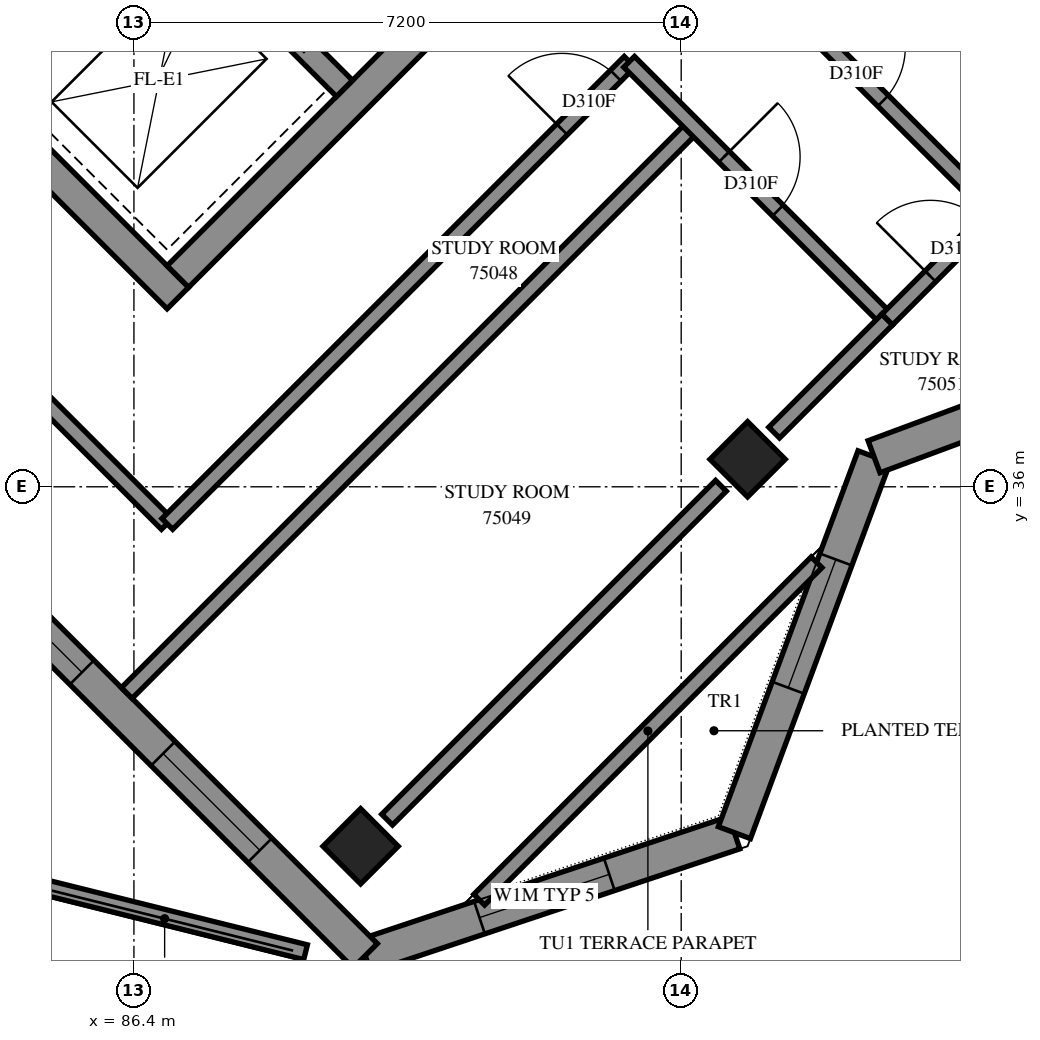
"""IFC4 building model, lengths in metres.
Left out: names, types, materials, properties, quantities, classifications, styles, units other than length and angle.
Written with IfcOpenShell. Run it as: python <this file> out.ifc"""

import sys

from ifc_helpers import new_model, si_unit, direction, frame, frame_2d, origin, origin_2d, place, context, subcontext, project, spatial, polyline, rectangle, outline, extrude, element, fill, save


model = new_model("IFC4")
c1 = context("Model", 3, precision=1e-05, world=origin(), true_north=direction((0.0, 1.0)))
c2 = subcontext(c1, "Body", "Model", "MODEL_VIEW")
j1 = project(units=[si_unit("LENGTHUNIT", "METRE"), si_unit("PLANEANGLEUNIT", "RADIAN")], contexts=[c1])
p1 = place(None, origin())
s1 = spatial("IfcSite", under=j1, at=p1, CompositionType="ELEMENT")
p2 = place(p1, origin())
s2 = spatial("IfcBuilding", under=s1, at=p2, CompositionType="ELEMENT")
p3 = place(p2, frame((0.0, 0.0, 274.4)))
s3 = spatial("IfcBuildingStorey", under=s2, at=p3, CompositionType="ELEMENT", Elevation=274.4)
for number, where, z_axis, x_axis in (
    (1, (94.474, 36.362, 0.0), (0.0, 0.0, 1.0), (0.707, -0.707, 0.0)),
    (2, (89.382, 31.271, 0.0), (0.0, 0.0, 1.0), (0.707, -0.707, 0.0)),
):
    element("IfcColumn", number, at=place(p3, frame(where, z_axis=z_axis, x_axis=x_axis)), inside=s3, PredefinedType="COLUMN", context=c2, shape_type="SweptSolid", body=[
        extrude(rectangle(XDim=0.7, YDim=0.7, at=origin_2d()), origin(), (0.0, 0.0, 1.0), 3.1),
    ])
p4 = place(p3, frame((76.23, 49.231, -0.3), z_axis=(0.0, 0.0, 1.0), x_axis=(0.7071034917, -0.7071100706, 0.0)))
e3 = element("IfcWall", 3, at=p4, inside=s3, PredefinedType="SHEAR", context=c2, shape_type="SweptSolid", body=[
    extrude(rectangle(XDim=15.2, YDim=0.4, at=frame_2d((7.6, 0.0))), origin(), (0.0, 0.0, 1.0), 2.7),
])
p5 = place(p3, frame((86.978, 38.766, -0.3), z_axis=(0.0, 0.0, 1.0), x_axis=(0.7071067812, 0.7071067812, 0.0)))
e4 = element("IfcWall", 4, at=p5, inside=s3, PredefinedType="SHEAR", context=c2, shape_type="SweptSolid", body=[
    extrude(rectangle(XDim=14.4, YDim=0.4, at=frame_2d((7.2, 0.0))), origin(), (0.0, 0.0, 1.0), 2.7),
])
p6 = place(p5, frame((4.55, 0.0, 0.3)))
e5 = element("IfcOpeningElement", 5, at=p6, cuts=e4, PredefinedType="OPENING", context=c2, shape_type="SweptSolid", body=[
    extrude(rectangle(XDim=1.1, YDim=2.1, at=frame_2d((0.55, 1.05))), frame((0.0, 0.21, 0.0), z_axis=(0.0, -1.0, 0.0), x_axis=(1.0, 0.0, 0.0)), (0.0, 0.0, 1.0), 0.42),
])
p7 = place(p5, frame((11.35, 0.0, 0.3)))
e6 = element("IfcOpeningElement", 6, at=p7, cuts=e4, PredefinedType="OPENING", context=c2, shape_type="SweptSolid", body=[
    extrude(rectangle(XDim=1.1, YDim=2.1, at=frame_2d((0.55, 1.05))), frame((0.0, 0.21, 0.0), z_axis=(0.0, -1.0, 0.0), x_axis=(1.0, 0.0, 0.0)), (0.0, 0.0, 1.0), 0.42),
])
p8 = place(p3, frame((84.291, 41.453, 0.0), z_axis=(0.0, 0.0, 1.0), x_axis=(0.7071067812, 0.7071067812, 0.0)))
e7 = element("IfcWall", 7, at=p8, inside=s3, PredefinedType="SOLIDWALL", context=c2, shape_type="SweptSolid", body=[
    extrude(rectangle(XDim=3.3, YDim=0.3, at=frame_2d((1.65, 0.0))), origin(), (0.0, 0.0, 1.0), 3.1),
])
p9 = place(p3, frame((78.988, 51.423, 0.0), z_axis=(0.0, 0.0, 1.0), x_axis=(0.7071067812, -0.7071067812, 0.0)))
e8 = element("IfcWall", 8, at=p9, inside=s3, PredefinedType="SOLIDWALL", context=c2, shape_type="SweptSolid", body=[
    extrude(rectangle(XDim=14.4, YDim=0.3, at=frame_2d((7.2, 0.0))), origin(), (0.0, 0.0, 1.0), 3.1),
])
p10 = place(p9, frame((1.35, 0.0, 0.0)))
e9 = element("IfcOpeningElement", 9, at=p10, cuts=e8, PredefinedType="OPENING", context=c2, shape_type="SweptSolid", body=[
    extrude(rectangle(XDim=0.9, YDim=2.1, at=frame_2d((0.45, 1.05))), frame((0.0, 0.16, 0.0), z_axis=(0.0, -1.0, 0.0), x_axis=(1.0, 0.0, 0.0)), (0.0, 0.0, 1.0), 0.32),
])
p11 = place(p9, frame((4.95, 0.0, 0.0)))
e10 = element("IfcOpeningElement", 10, at=p11, cuts=e8, PredefinedType="OPENING", context=c2, shape_type="SweptSolid", body=[
    extrude(rectangle(XDim=0.9, YDim=2.1, at=frame_2d((0.45, 1.05))), frame((0.0, 0.16, 0.0), z_axis=(0.0, -1.0, 0.0), x_axis=(1.0, 0.0, 0.0)), (0.0, 0.0, 1.0), 0.32),
])
p12 = place(p9, frame((8.55, 0.0, 0.0)))
e11 = element("IfcOpeningElement", 11, at=p12, cuts=e8, PredefinedType="OPENING", context=c2, shape_type="SweptSolid", body=[
    extrude(rectangle(XDim=0.9, YDim=2.1, at=frame_2d((0.45, 1.05))), frame((0.0, 0.16, 0.0), z_axis=(0.0, -1.0, 0.0), x_axis=(1.0, 0.0, 0.0)), (0.0, 0.0, 1.0), 0.32),
])
p13 = place(p9, frame((12.05, 0.0, 0.0)))
e12 = element("IfcOpeningElement", 12, at=p13, cuts=e8, PredefinedType="OPENING", context=c2, shape_type="SweptSolid", body=[
    extrude(rectangle(XDim=1.1, YDim=2.1, at=frame_2d((0.55, 1.05))), frame((0.0, 0.16, 0.0), z_axis=(0.0, -1.0, 0.0), x_axis=(1.0, 0.0, 0.0)), (0.0, 0.0, 1.0), 0.32),
])
p14 = place(p3, frame((89.443, 29.831, 0.0), z_axis=(0.0, 0.0, 1.0), x_axis=(0.9486832981, 0.316227766, 0.0)))
e13 = element("IfcWall", 13, at=p14, inside=s3, PredefinedType="SOLIDWALL", context=c2, shape_type="SweptSolid", body=[
    extrude(outline(polyline([(-0.139, -0.225), (5.228, -0.225), (5.012, 0.225), (0.139, 0.225), (-0.139, -0.225)])), origin(), (0.0, 0.0, 1.0), 3.1),
])
p15 = place(p14, frame((1.584, 0.0, 0.7)))
e14 = element("IfcOpeningElement", 14, at=p15, cuts=e13, PredefinedType="OPENING", context=c2, shape_type="SweptSolid", body=[
    extrude(rectangle(XDim=1.8, YDim=1.8, at=frame_2d((0.9, 0.9))), frame((0.0, 0.235, 0.0), z_axis=(0.0, -1.0, 0.0), x_axis=(1.0, 0.0, 0.0)), (0.0, 0.0, 1.0), 0.47),
])
p16 = place(p3, frame((94.3, 31.45, 0.0), z_axis=(0.0, 0.0, 1.0), x_axis=(0.3481927166, 0.9374229739, 0.0)))
e15 = element("IfcWall", 15, at=p16, inside=s3, PredefinedType="SOLIDWALL", context=c2, shape_type="SweptSolid", body=[
    extrude(outline(polyline([(-0.108, -0.225), (5.172, -0.225), (5.379, 0.225), (0.108, 0.225), (-0.108, -0.225)])), origin(), (0.0, 0.0, 1.0), 3.1),
])
p17 = place(p16, frame((2.034, 0.0, 0.7)))
e16 = element("IfcOpeningElement", 16, at=p17, cuts=e15, PredefinedType="OPENING", context=c2, shape_type="SweptSolid", body=[
    extrude(rectangle(XDim=1.8, YDim=1.8, at=frame_2d((0.9, 0.9))), frame((0.0, 0.235, 0.0), z_axis=(0.0, -1.0, 0.0), x_axis=(1.0, 0.0, 0.0)), (0.0, 0.0, 1.0), 0.47),
])
p18 = place(p3, frame((96.137, 36.395, 0.0), z_axis=(0.0, 0.0, 1.0), x_axis=(0.937429161, 0.3481760591, 0.0)))
e17 = element("IfcWall", 17, at=p18, inside=s3, PredefinedType="SOLIDWALL", context=c2, shape_type="SweptSolid", body=[
    extrude(outline(polyline([(0.103, -0.225), (5.383, -0.225), (5.168, 0.225), (-0.103, 0.225), (0.103, -0.225)])), origin(), (0.0, 0.0, 1.0), 3.1),
])
p19 = place(p18, frame((2.151, 0.0, 0.7)))
e18 = element("IfcOpeningElement", 18, at=p19, cuts=e17, PredefinedType="OPENING", context=c2, shape_type="SweptSolid", body=[
    extrude(rectangle(XDim=1.8, YDim=1.8, at=frame_2d((0.9, 0.9))), frame((0.0, 0.235, 0.0), z_axis=(0.0, -1.0, 0.0), x_axis=(1.0, 0.0, 0.0)), (0.0, 0.0, 1.0), 0.47),
])
p20 = place(p3, frame((83.87, 35.404, 0.0), z_axis=(0.0, 0.0, 1.0), x_axis=(0.7071067812, -0.7071067812, 0.0)))
e19 = element("IfcWall", 19, at=p20, inside=s3, PredefinedType="SOLIDWALL", context=c2, shape_type="SweptSolid", body=[
    extrude(outline(polyline([(0.063, -0.225), (8.021, -0.225), (7.743, 0.225), (-0.063, 0.225), (0.063, -0.225)])), origin(), (0.0, 0.0, 1.0), 3.1),
])
p21 = place(p20, frame((0.81, 0.0, 0.7)))
e20 = element("IfcOpeningElement", 20, at=p21, cuts=e19, PredefinedType="OPENING", context=c2, shape_type="SweptSolid", body=[
    extrude(rectangle(XDim=1.8, YDim=1.8, at=frame_2d((0.9, 0.9))), frame((0.0, 0.235, 0.0), z_axis=(0.0, -1.0, 0.0), x_axis=(1.0, 0.0, 0.0)), (0.0, 0.0, 1.0), 0.47),
])
p22 = place(p20, frame((4.121, 0.0, 0.7)))
e21 = element("IfcOpeningElement", 21, at=p22, cuts=e19, PredefinedType="OPENING", context=c2, shape_type="SweptSolid", body=[
    extrude(rectangle(XDim=1.8, YDim=1.8, at=frame_2d((0.9, 0.9))), frame((0.0, 0.235, 0.0), z_axis=(0.0, -1.0, 0.0), x_axis=(1.0, 0.0, 0.0)), (0.0, 0.0, 1.0), 0.47),
])
p23 = place(p3, frame((95.381, 35.007, 0.0), z_axis=(0.0, 0.0, 1.0), x_axis=(-0.7071067812, -0.7071067812, 0.0)))
e22 = element("IfcWall", 22, at=p23, inside=s3, PredefinedType="PARAPET", context=c2, shape_type="SweptSolid", body=[
    extrude(outline(polyline([(0.0, -0.1), (6.277, -0.1), (6.277, 0.1), (0.0, 0.1), (0.0, -0.1)])), origin(), (0.0, 0.0, 1.0), 0.25),
])
p24 = place(p3, frame((86.306, 33.287, 0.0), z_axis=(0.0, 0.0, 1.0), x_axis=(0.7071020418, 0.7071115206, 0.0)))
e23 = element("IfcWall", 23, at=p24, inside=s3, PredefinedType="PARTITIONING", context=c2, shape_type="SweptSolid", body=[
    extrude(rectangle(XDim=10.55, YDim=0.2, at=frame_2d((5.275, 0.0))), origin(), (0.0, 0.0, 1.0), 3.1),
])
p25 = place(p3, frame((80.747, 41.597, 0.0), z_axis=(0.0, 0.0, 1.0), x_axis=(0.7071067812, -0.7071067812, 0.0)))
e24 = element("IfcWall", 24, at=p25, inside=s3, PredefinedType="PARTITIONING", context=c2, shape_type="SweptSolid", body=[
    extrude(rectangle(XDim=8.607, YDim=0.2, at=frame_2d((4.303, 0.0))), origin(), (0.0, 0.0, 1.0), 3.1),
])
p26 = place(p25, frame((0.195, 0.0, 0.0)))
e25 = element("IfcOpeningElement", 25, at=p26, cuts=e24, PredefinedType="OPENING", context=c2, shape_type="SweptSolid", body=[
    extrude(rectangle(XDim=1.0, YDim=2.1, at=frame_2d((0.5, 1.05))), frame((0.0, 0.11, 0.0), z_axis=(0.0, -1.0, 0.0), x_axis=(1.0, 0.0, 0.0)), (0.0, 0.0, 1.0), 0.22),
])
p27 = place(p25, frame((3.175, 0.0, 0.0)))
e26 = element("IfcOpeningElement", 26, at=p27, cuts=e24, PredefinedType="OPENING", context=c2, shape_type="SweptSolid", body=[
    extrude(rectangle(XDim=1.0, YDim=2.1, at=frame_2d((0.5, 1.05))), frame((0.0, 0.11, 0.0), z_axis=(0.0, -1.0, 0.0), x_axis=(1.0, 0.0, 0.0)), (0.0, 0.0, 1.0), 0.22),
])
p28 = place(p3, frame((86.839, 35.511, 0.0), z_axis=(0.0, 0.0, 1.0), x_axis=(0.707223053, 0.7069904903, 0.0)))
e27 = element("IfcWall", 27, at=p28, inside=s3, PredefinedType="PARTITIONING", context=c2, shape_type="SweptSolid", body=[
    extrude(rectangle(XDim=8.6, YDim=0.2, at=frame_2d((4.3, 0.0))), origin(), (0.0, 0.0, 1.0), 3.1),
])
p29 = place(p28, frame((7.343, 0.0, 0.0)))
e28 = element("IfcOpeningElement", 28, at=p29, cuts=e27, PredefinedType="OPENING", context=c2, shape_type="SweptSolid", body=[
    extrude(rectangle(XDim=1.0, YDim=2.1, at=frame_2d((0.5, 1.05))), frame((0.0, 0.11, 0.0), z_axis=(0.0, -1.0, 0.0), x_axis=(1.0, 0.0, 0.0)), (0.0, 0.0, 1.0), 0.22),
])
p30 = place(p3, frame((89.731, 31.621, 0.0), z_axis=(0.0, 0.0, 1.0), x_axis=(0.7071067812, 0.7071067812, 0.0)))
e29 = element("IfcWall", 29, at=p30, inside=s3, PredefinedType="PARTITIONING", context=c2, shape_type="SweptSolid", body=[
    extrude(rectangle(XDim=6.211, YDim=0.2, at=frame_2d((3.106, 0.0))), origin(), (0.0, 0.0, 1.0), 2.6),
])
p31 = place(p3, frame((92.915, 41.591, 0.0), z_axis=(0.0, 0.0, 1.0), x_axis=(0.7071067812, -0.7071067812, 0.0)))
e30 = element("IfcWall", 30, at=p31, inside=s3, PredefinedType="PARTITIONING", context=c2, shape_type="SweptSolid", body=[
    extrude(rectangle(XDim=4.8, YDim=0.2, at=frame_2d((2.4, 0.0))), origin(), (0.0, 0.0, 1.0), 3.1),
])
p32 = place(p31, frame((1.767, 0.0, 0.0)))
e31 = element("IfcOpeningElement", 31, at=p32, cuts=e30, PredefinedType="OPENING", context=c2, shape_type="SweptSolid", body=[
    extrude(rectangle(XDim=1.0, YDim=2.1, at=frame_2d((0.5, 1.05))), frame((0.0, 0.11, 0.0), z_axis=(0.0, -1.0, 0.0), x_axis=(1.0, 0.0, 0.0)), (0.0, 0.0, 1.0), 0.22),
])
p33 = place(p3, frame((94.329, 43.005, 0.0), z_axis=(0.0, 0.0, 1.0), x_axis=(0.7071067812, -0.7071067812, 0.0)))
e32 = element("IfcWall", 32, at=p33, inside=s3, PredefinedType="PARTITIONING", context=c2, shape_type="SweptSolid", body=[
    extrude(rectangle(XDim=4.8, YDim=0.2, at=frame_2d((2.4, 0.0))), origin(), (0.0, 0.0, 1.0), 3.1),
])
p34 = place(p33, frame((1.725, 0.0, 0.0)))
e33 = element("IfcOpeningElement", 33, at=p34, cuts=e32, PredefinedType="OPENING", context=c2, shape_type="SweptSolid", body=[
    extrude(rectangle(XDim=1.0, YDim=2.1, at=frame_2d((0.5, 1.05))), frame((0.0, 0.11, 0.0), z_axis=(0.0, -1.0, 0.0), x_axis=(1.0, 0.0, 0.0)), (0.0, 0.0, 1.0), 0.22),
])
p35 = place(p3, frame((94.823, 36.713, 0.0), z_axis=(0.0, 0.0, 1.0), x_axis=(0.7071067812, 0.7071067812, 0.0)))
e34 = element("IfcWall", 34, at=p35, inside=s3, PredefinedType="PARTITIONING", context=c2, shape_type="SweptSolid", body=[
    extrude(rectangle(XDim=2.104, YDim=0.2, at=frame_2d((1.052, 0.0))), origin(), (0.0, 0.0, 1.0), 2.6),
])
p36 = place(p3, frame((96.311, 38.201, 0.0), z_axis=(0.0, 0.0, 1.0), x_axis=(0.7071067812, 0.7071067812, 0.0)))
e35 = element("IfcWall", 35, at=p36, inside=s3, PredefinedType="PARTITIONING", context=c2, shape_type="SweptSolid", body=[
    extrude(rectangle(XDim=2.0, YDim=0.2, at=frame_2d((1.0, 0.0))), origin(), (0.0, 0.0, 1.0), 2.6),
])
p37 = place(p36, frame((0.803, 0.0, 0.0)))
e36 = element("IfcOpeningElement", 36, at=p37, cuts=e35, PredefinedType="OPENING", context=c2, shape_type="SweptSolid", body=[
    extrude(rectangle(XDim=1.0, YDim=2.1, at=frame_2d((0.5, 1.05))), frame((0.0, 0.11, 0.0), z_axis=(0.0, -1.0, 0.0), x_axis=(1.0, 0.0, 0.0)), (0.0, 0.0, 1.0), 0.22),
])
p38 = place(p3, frame((88.658, 29.877, 0.0), z_axis=(0.0, 0.0, 1.0), x_axis=(-0.9704193156, 0.2414256654, 0.0)))
e37 = element("IfcWall", 37, at=p38, inside=s3, PredefinedType="PARAPET", context=c2, shape_type="SweptSolid", body=[
    extrude(rectangle(XDim=3.88, YDim=0.2, at=frame_2d((1.94, 0.0))), origin(), (0.0, 0.0, 1.0), 0.2),
])
p39 = place(p15, origin())
e38 = element("IfcWindow", 38, at=p39, inside=s3, PartitioningType="SINGLE_PANEL", PredefinedType="WINDOW", context=c2, shape_type="SweptSolid", body=[
    extrude(rectangle(XDim=1.8, YDim=1.8, at=frame_2d((0.9, 0.9))), frame((0.0, 0.135, 0.0), z_axis=(0.0, -1.0, 0.0), x_axis=(1.0, 0.0, 0.0)), (0.0, 0.0, 1.0), 0.06),
])
fill(e14, e38)
p40 = place(p17, origin())
e39 = element("IfcWindow", 39, at=p40, inside=s3, PartitioningType="SINGLE_PANEL", PredefinedType="WINDOW", context=c2, shape_type="SweptSolid", body=[
    extrude(rectangle(XDim=1.8, YDim=1.8, at=frame_2d((0.9, 0.9))), frame((0.0, 0.125, 0.0), z_axis=(0.0, -1.0, 0.0), x_axis=(1.0, 0.0, 0.0)), (0.0, 0.0, 1.0), 0.06),
])
fill(e16, e39)
p41 = place(p21, origin())
e40 = element("IfcWindow", 40, at=p41, inside=s3, PartitioningType="SINGLE_PANEL", PredefinedType="WINDOW", context=c2, shape_type="SweptSolid", body=[
    extrude(rectangle(XDim=1.8, YDim=1.8, at=frame_2d((0.9, 0.9))), frame((0.0, 0.205, 0.0), z_axis=(0.0, -1.0, 0.0), x_axis=(1.0, 0.0, 0.0)), (0.0, 0.0, 1.0), 0.06),
])
fill(e20, e40)
p42 = place(p22, origin())
e41 = element("IfcWindow", 41, at=p42, inside=s3, PartitioningType="SINGLE_PANEL", PredefinedType="WINDOW", context=c2, shape_type="SweptSolid", body=[
    extrude(rectangle(XDim=1.8, YDim=1.8, at=frame_2d((0.9, 0.9))), frame((0.0, 0.205, 0.0), z_axis=(0.0, -1.0, 0.0), x_axis=(1.0, 0.0, 0.0)), (0.0, 0.0, 1.0), 0.06),
])
fill(e21, e41)
p43 = place(p29, origin())
e42 = element("IfcDoor", 42, at=p43, inside=s3, OperationType="SINGLE_SWING_RIGHT", PredefinedType="DOOR", context=c2, shape_type="SweptSolid", body=[
    extrude(rectangle(XDim=1.0, YDim=2.1, at=frame_2d((0.5, 1.05))), frame((0.0, 0.025, 0.0), z_axis=(0.0, -1.0, 0.0), x_axis=(1.0, 0.0, 0.0)), (0.0, 0.0, 1.0), 0.05),
])
fill(e28, e42)
p44 = place(p32, origin())
e43 = element("IfcDoor", 43, at=p44, inside=s3, OperationType="SINGLE_SWING_LEFT", PredefinedType="DOOR", context=c2, shape_type="SweptSolid", body=[
    extrude(rectangle(XDim=1.0, YDim=2.1, at=frame_2d((0.5, 1.05))), frame((0.0, 0.025, 0.0), z_axis=(0.0, -1.0, 0.0), x_axis=(1.0, 0.0, 0.0)), (0.0, 0.0, 1.0), 0.05),
])
fill(e31, e43)
p45 = place(p34, origin())
e44 = element("IfcDoor", 44, at=p45, inside=s3, OperationType="SINGLE_SWING_RIGHT", PredefinedType="DOOR", context=c2, shape_type="SweptSolid", body=[
    extrude(rectangle(XDim=1.0, YDim=2.1, at=frame_2d((0.5, 1.05))), frame((0.0, 0.025, 0.0), z_axis=(0.0, -1.0, 0.0), x_axis=(1.0, 0.0, 0.0)), (0.0, 0.0, 1.0), 0.05),
])
fill(e33, e44)
p46 = place(p37, origin())
e45 = element("IfcDoor", 45, at=p46, inside=s3, OperationType="SINGLE_SWING_RIGHT", PredefinedType="DOOR", context=c2, shape_type="SweptSolid", body=[
    extrude(rectangle(XDim=1.0, YDim=2.1, at=frame_2d((0.5, 1.05))), frame((0.0, 0.025, 0.0), z_axis=(0.0, -1.0, 0.0), x_axis=(1.0, 0.0, 0.0)), (0.0, 0.0, 1.0), 0.05),
])
fill(e36, e45)
save(model, sys.argv[1])
